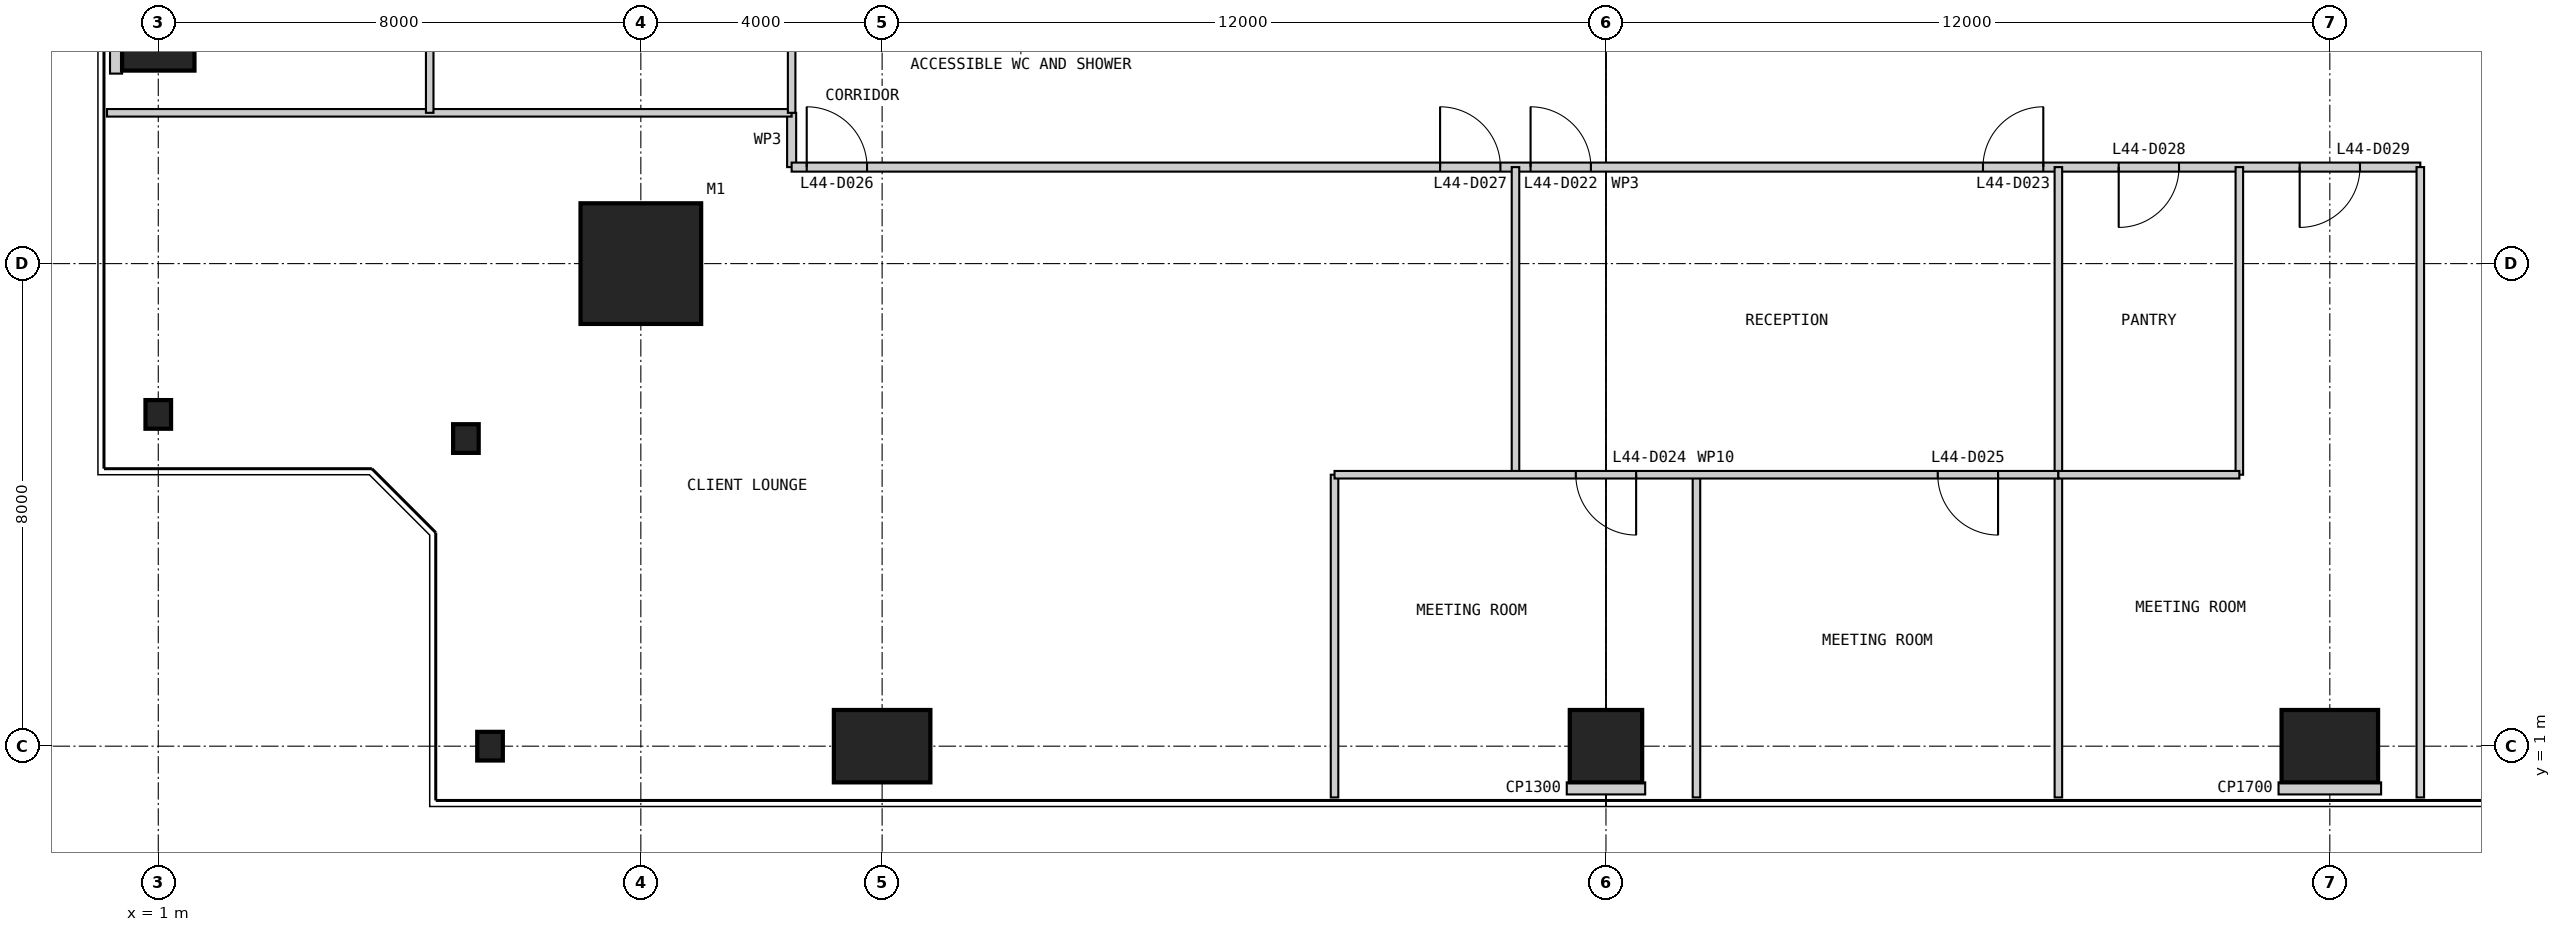
"""IFC4 building model, lengths in metres.
Left out: names, types, materials, properties, quantities, classifications, styles, units other than length and angle.
Written with IfcOpenShell. Run it as: python <this file> out.ifc"""

import sys

from ifc_helpers import new_model, si_unit, direction, frame, frame_2d, origin, origin_2d, place, context, subcontext, project, spatial, rectangle, i_section, extrude, element, fill, save


model = new_model("IFC4")
c1 = context("Model", 3, precision=1e-05, world=origin(), true_north=direction((0.0, 1.0)))
c2 = subcontext(c1, "Body", "Model", "MODEL_VIEW")
j1 = project(units=[si_unit("LENGTHUNIT", "METRE"), si_unit("PLANEANGLEUNIT", "RADIAN")], contexts=[c1])
p1 = place(None, origin())
s1 = spatial("IfcSite", under=j1, at=p1, CompositionType="ELEMENT")
p2 = place(p1, origin())
s2 = spatial("IfcBuilding", under=s1, at=p2, CompositionType="ELEMENT")
p3 = place(p2, frame((0.0, 0.0, 189.8)))
s3 = spatial("IfcBuildingStorey", under=s2, at=p3, CompositionType="ELEMENT", Elevation=189.8)
p4 = place(p3, frame((9.0, 9.0, 0.0), z_axis=(0.0, 0.0, 1.0), x_axis=(1.0, 0.0, 0.0)))
e1 = element("IfcColumn", 1, at=p4, inside=s3, PredefinedType="COLUMN", context=c2, shape_type="SweptSolid", body=[
    extrude(rectangle(XDim=2.0, YDim=2.0, at=origin_2d()), origin(), (0.0, 0.0, 1.0), 4.0),
])
p5 = place(p3, frame((6.5, 1.0, 0.0), z_axis=(0.0, 0.0, 1.0), x_axis=(1.0, 0.0, 0.0)))
e2 = element("IfcColumn", 2, at=p5, inside=s3, PredefinedType="COLUMN", context=c2, shape_type="SweptSolid", body=[
    extrude(i_section(OverallWidth=0.424, OverallDepth=0.475, WebThickness=0.048, FlangeThickness=0.077, at=origin_2d()), origin(), (0.0, 0.0, 1.0), 4.0),
])
p6 = place(p3, frame((13.0, 1.0, 0.0), z_axis=(0.0, 0.0, 1.0), x_axis=(1.0, 0.0, 0.0)))
e3 = element("IfcColumn", 3, at=p6, inside=s3, PredefinedType="COLUMN", context=c2, shape_type="SweptSolid", body=[
    extrude(rectangle(XDim=1.6, YDim=1.2, at=origin_2d()), origin(), (0.0, 0.0, 1.0), 4.0),
])
p7 = place(p3, frame((25.0, 1.0, 0.0), z_axis=(0.0, 0.0, 1.0), x_axis=(1.0, 0.0, 0.0)))
e4 = element("IfcColumn", 4, at=p7, inside=s3, PredefinedType="COLUMN", context=c2, shape_type="SweptSolid", body=[
    extrude(rectangle(XDim=1.2, YDim=1.2, at=origin_2d()), origin(), (0.0, 0.0, 1.0), 4.0),
])
p8 = place(p3, frame((37.0, 1.0, 0.0), z_axis=(0.0, 0.0, 1.0), x_axis=(1.0, 0.0, 0.0)))
e5 = element("IfcColumn", 5, at=p8, inside=s3, PredefinedType="COLUMN", context=c2, shape_type="SweptSolid", body=[
    extrude(rectangle(XDim=1.6, YDim=1.2, at=origin_2d()), origin(), (0.0, 0.0, 1.0), 4.0),
])
p9 = place(p3, frame((1.0, 13.0, 0.0), z_axis=(0.0, 0.0, 1.0), x_axis=(1.0, 0.0, 0.0)))
e6 = element("IfcColumn", 6, at=p9, inside=s3, PredefinedType="COLUMN", context=c2, shape_type="SweptSolid", body=[
    extrude(rectangle(XDim=1.2, YDim=1.6, at=origin_2d()), origin(), (0.0, 0.0, 1.0), 4.0),
])
for number, where, z_axis, x_axis in (
    (7, (1.0, 6.5, 0.0), (0.0, 0.0, 1.0), (1.0, 0.0, 0.0)),
    (8, (6.1, 6.1, 0.0), (0.0, 0.0, 1.0), (1.0, 0.0, 0.0)),
):
    element("IfcColumn", number, at=place(p3, frame(where, z_axis=z_axis, x_axis=x_axis)), inside=s3, PredefinedType="COLUMN", context=c2, shape_type="SweptSolid", body=[
        extrude(i_section(OverallWidth=0.424, OverallDepth=0.475, WebThickness=0.048, FlangeThickness=0.077, at=origin_2d()), origin(), (0.0, 0.0, 1.0), 4.0),
    ])
p10 = place(p3, frame((11.5, 11.5, 0.0), z_axis=(0.0, 0.0, 1.0), x_axis=(0.0, -1.0, 0.0)))
e9 = element("IfcWall", 9, at=p10, inside=s3, PredefinedType="PARTITIONING", context=c2, shape_type="SweptSolid", body=[
    extrude(rectangle(XDim=0.9, YDim=0.15, at=frame_2d((0.45, 0.0))), origin(), (0.0, 0.0, 1.0), 3.85),
])
p11 = place(p3, frame((11.5, 10.6, 0.0), z_axis=(0.0, 0.0, 1.0), x_axis=(1.0, 0.0, 0.0)))
e10 = element("IfcWall", 10, at=p11, inside=s3, PredefinedType="PARTITIONING", context=c2, shape_type="SweptSolid", body=[
    extrude(rectangle(XDim=27.0, YDim=0.15, at=frame_2d((13.5, 0.0))), origin(), (0.0, 0.0, 1.0), 3.85),
])
p12 = place(p11, frame((12.25, 0.0, 0.0)))
e11 = element("IfcOpeningElement", 11, at=p12, cuts=e10, PredefinedType="OPENING", context=c2, shape_type="SweptSolid", body=[
    extrude(rectangle(XDim=1.0, YDim=2.2, at=frame_2d((0.5, 1.1))), frame((0.0, 0.085, 0.0), z_axis=(0.0, -1.0, 0.0), x_axis=(1.0, 0.0, 0.0)), (0.0, 0.0, 1.0), 0.17),
])
p13 = place(p11, frame((19.75, 0.0, 0.0)))
e12 = element("IfcOpeningElement", 12, at=p13, cuts=e10, PredefinedType="OPENING", context=c2, shape_type="SweptSolid", body=[
    extrude(rectangle(XDim=1.0, YDim=2.2, at=frame_2d((0.5, 1.1))), frame((0.0, 0.085, 0.0), z_axis=(0.0, -1.0, 0.0), x_axis=(1.0, 0.0, 0.0)), (0.0, 0.0, 1.0), 0.17),
])
p14 = place(p11, frame((0.25, 0.0, 0.0)))
e13 = element("IfcOpeningElement", 13, at=p14, cuts=e10, PredefinedType="OPENING", context=c2, shape_type="SweptSolid", body=[
    extrude(rectangle(XDim=1.0, YDim=2.2, at=frame_2d((0.5, 1.1))), frame((0.0, 0.085, 0.0), z_axis=(0.0, -1.0, 0.0), x_axis=(1.0, 0.0, 0.0)), (0.0, 0.0, 1.0), 0.17),
])
p15 = place(p11, frame((10.75, 0.0, 0.0)))
e14 = element("IfcOpeningElement", 14, at=p15, cuts=e10, PredefinedType="OPENING", context=c2, shape_type="SweptSolid", body=[
    extrude(rectangle(XDim=1.0, YDim=2.2, at=frame_2d((0.5, 1.1))), frame((0.0, 0.085, 0.0), z_axis=(0.0, -1.0, 0.0), x_axis=(1.0, 0.0, 0.0)), (0.0, 0.0, 1.0), 0.17),
])
p16 = place(p11, frame((22.0, 0.0, 0.0)))
e15 = element("IfcOpeningElement", 15, at=p16, cuts=e10, PredefinedType="OPENING", context=c2, shape_type="SweptSolid", body=[
    extrude(rectangle(XDim=1.0, YDim=2.2, at=frame_2d((0.5, 1.1))), frame((0.0, 0.085, 0.0), z_axis=(0.0, -1.0, 0.0), x_axis=(1.0, 0.0, 0.0)), (0.0, 0.0, 1.0), 0.17),
])
p17 = place(p11, frame((25.0, 0.0, 0.0)))
e16 = element("IfcOpeningElement", 16, at=p17, cuts=e10, PredefinedType="OPENING", context=c2, shape_type="SweptSolid", body=[
    extrude(rectangle(XDim=1.0, YDim=2.2, at=frame_2d((0.5, 1.1))), frame((0.0, 0.085, 0.0), z_axis=(0.0, -1.0, 0.0), x_axis=(1.0, 0.0, 0.0)), (0.0, 0.0, 1.0), 0.17),
])
p18 = place(p3, frame((0.15, 11.5, 0.0), z_axis=(0.0, 0.0, 1.0), x_axis=(1.0, 0.0, 0.0)))
e17 = element("IfcWall", 17, at=p18, inside=s3, PredefinedType="PARTITIONING", context=c2, shape_type="SweptSolid", body=[
    extrude(rectangle(XDim=11.35, YDim=0.125, at=frame_2d((5.675, 0.0))), origin(), (0.0, 0.0, 1.0), 3.85),
])
p19 = place(p3, frame((20.5, 0.15, 0.0), z_axis=(0.0, 0.0, 1.0), x_axis=(0.0, 1.0, 0.0)))
e18 = element("IfcWall", 18, at=p19, inside=s3, PredefinedType="PARTITIONING", context=c2, shape_type="SweptSolid", body=[
    extrude(rectangle(XDim=5.35, YDim=0.125, at=frame_2d((2.675, 0.0))), origin(), (0.0, 0.0, 1.0), 3.85),
])
p20 = place(p3, frame((23.5, 5.5, 0.0), z_axis=(0.0, 0.0, 1.0), x_axis=(0.0, 1.0, 0.0)))
e19 = element("IfcWall", 19, at=p20, inside=s3, PredefinedType="PARTITIONING", context=c2, shape_type="SweptSolid", body=[
    extrude(rectangle(XDim=5.1, YDim=0.125, at=frame_2d((2.55, 0.0))), origin(), (0.0, 0.0, 1.0), 3.85),
])
p21 = place(p3, frame((26.5, 0.15, 0.0), z_axis=(0.0, 0.0, 1.0), x_axis=(0.0, 1.0, 0.0)))
e20 = element("IfcWall", 20, at=p21, inside=s3, PredefinedType="PARTITIONING", context=c2, shape_type="SweptSolid", body=[
    extrude(rectangle(XDim=5.35, YDim=0.125, at=frame_2d((2.675, 0.0))), origin(), (0.0, 0.0, 1.0), 3.85),
])
p22 = place(p3, frame((32.5, 0.15, 0.0), z_axis=(0.0, 0.0, 1.0), x_axis=(0.0, 1.0, 0.0)))
e21 = element("IfcWall", 21, at=p22, inside=s3, PredefinedType="PARTITIONING", context=c2, shape_type="SweptSolid", body=[
    extrude(rectangle(XDim=10.45, YDim=0.125, at=frame_2d((5.225, 0.0))), origin(), (0.0, 0.0, 1.0), 3.85),
])
p23 = place(p3, frame((35.5, 5.5, 0.0), z_axis=(0.0, 0.0, 1.0), x_axis=(0.0, 1.0, 0.0)))
e22 = element("IfcWall", 22, at=p23, inside=s3, PredefinedType="PARTITIONING", context=c2, shape_type="SweptSolid", body=[
    extrude(rectangle(XDim=5.1, YDim=0.125, at=frame_2d((2.55, 0.0))), origin(), (0.0, 0.0, 1.0), 3.85),
])
p24 = place(p3, frame((20.5, 5.5, 0.0), z_axis=(0.0, 0.0, 1.0), x_axis=(1.0, 0.0, 0.0)))
e23 = element("IfcWall", 23, at=p24, inside=s3, PredefinedType="PARTITIONING", context=c2, shape_type="SweptSolid", body=[
    extrude(rectangle(XDim=12.0, YDim=0.125, at=frame_2d((6.0, 0.0))), origin(), (0.0, 0.0, 1.0), 3.85),
])
p25 = place(p24, frame((4.0, 0.0, 0.0)))
e24 = element("IfcOpeningElement", 24, at=p25, cuts=e23, PredefinedType="OPENING", context=c2, shape_type="SweptSolid", body=[
    extrude(rectangle(XDim=1.0, YDim=2.2, at=frame_2d((0.5, 1.1))), frame((0.0, 0.073, 0.0), z_axis=(0.0, -1.0, 0.0), x_axis=(1.0, 0.0, 0.0)), (0.0, 0.0, 1.0), 0.145),
])
p26 = place(p24, frame((10.0, 0.0, 0.0)))
e25 = element("IfcOpeningElement", 25, at=p26, cuts=e23, PredefinedType="OPENING", context=c2, shape_type="SweptSolid", body=[
    extrude(rectangle(XDim=1.0, YDim=2.2, at=frame_2d((0.5, 1.1))), frame((0.0, 0.073, 0.0), z_axis=(0.0, -1.0, 0.0), x_axis=(1.0, 0.0, 0.0)), (0.0, 0.0, 1.0), 0.145),
])
p27 = place(p3, frame((32.5, 5.5, 0.0), z_axis=(0.0, 0.0, 1.0), x_axis=(1.0, 0.0, 0.0)))
e26 = element("IfcWall", 26, at=p27, inside=s3, PredefinedType="PARTITIONING", context=c2, shape_type="SweptSolid", body=[
    extrude(rectangle(XDim=3.0, YDim=0.125, at=frame_2d((1.5, 0.0))), origin(), (0.0, 0.0, 1.0), 3.85),
])
p28 = place(p3, frame((38.5, 0.15, 0.0), z_axis=(0.0, 0.0, 1.0), x_axis=(0.0, 1.0, 0.0)))
e27 = element("IfcWall", 27, at=p28, inside=s3, PredefinedType="PARTITIONING", context=c2, shape_type="SweptSolid", body=[
    extrude(rectangle(XDim=10.45, YDim=0.125, at=frame_2d((5.225, 0.0))), origin(), (0.0, 0.0, 1.0), 3.85),
])
p29 = place(p3, frame((5.5, 35.5, 0.0), z_axis=(0.0, 0.0, 1.0), x_axis=(0.0, -1.0, 0.0)))
e28 = element("IfcWall", 28, at=p29, inside=s3, PredefinedType="PARTITIONING", context=c2, shape_type="SweptSolid", body=[
    extrude(rectangle(XDim=24.0, YDim=0.125, at=frame_2d((12.0, 0.0))), origin(), (0.0, 0.0, 1.0), 3.85),
])
p30 = place(p29, frame((4.05, 0.0, 0.0)))
e29 = element("IfcOpeningElement", 29, at=p30, cuts=e28, PredefinedType="OPENING", context=c2, shape_type="SweptSolid", body=[
    extrude(rectangle(XDim=0.9, YDim=2.2, at=frame_2d((0.45, 1.1))), frame((0.0, 0.073, 0.0), z_axis=(0.0, -1.0, 0.0), x_axis=(1.0, 0.0, 0.0)), (0.0, 0.0, 1.0), 0.145),
])
p31 = place(p29, frame((10.05, 0.0, 0.0)))
e30 = element("IfcOpeningElement", 30, at=p31, cuts=e28, PredefinedType="OPENING", context=c2, shape_type="SweptSolid", body=[
    extrude(rectangle(XDim=0.9, YDim=2.2, at=frame_2d((0.45, 1.1))), frame((0.0, 0.073, 0.0), z_axis=(0.0, -1.0, 0.0), x_axis=(1.0, 0.0, 0.0)), (0.0, 0.0, 1.0), 0.145),
])
p32 = place(p29, frame((16.05, 0.0, 0.0)))
e31 = element("IfcOpeningElement", 31, at=p32, cuts=e28, PredefinedType="OPENING", context=c2, shape_type="SweptSolid", body=[
    extrude(rectangle(XDim=0.9, YDim=2.2, at=frame_2d((0.45, 1.1))), frame((0.0, 0.073, 0.0), z_axis=(0.0, -1.0, 0.0), x_axis=(1.0, 0.0, 0.0)), (0.0, 0.0, 1.0), 0.145),
])
p33 = place(p29, frame((19.05, 0.0, 0.0)))
e32 = element("IfcOpeningElement", 32, at=p33, cuts=e28, PredefinedType="OPENING", context=c2, shape_type="SweptSolid", body=[
    extrude(rectangle(XDim=0.9, YDim=2.2, at=frame_2d((0.45, 1.1))), frame((0.0, 0.073, 0.0), z_axis=(0.0, -1.0, 0.0), x_axis=(1.0, 0.0, 0.0)), (0.0, 0.0, 1.0), 0.145),
])
p34 = place(p3, frame((11.5, 14.5, 0.0), z_axis=(0.0, 0.0, 1.0), x_axis=(0.0, -1.0, 0.0)))
e33 = element("IfcWall", 33, at=p34, inside=s3, PredefinedType="PARTITIONING", context=c2, shape_type="SweptSolid", body=[
    extrude(rectangle(XDim=3.0, YDim=0.125, at=frame_2d((1.5, 0.0))), origin(), (0.0, 0.0, 1.0), 3.85),
])
p35 = place(p3, frame((25.0, 0.2, 0.0), z_axis=(0.0, 0.0, 1.0), x_axis=(0.0, 1.0, 0.0)))
e34 = element("IfcWall", 34, at=p35, inside=s3, PredefinedType="PARTITIONING", context=c2, shape_type="SweptSolid", body=[
    extrude(rectangle(XDim=0.2, YDim=1.3, at=frame_2d((0.1, 0.0))), origin(), (0.0, 0.0, 1.0), 3.85),
])
for number, where, z_axis, x_axis in (
    (35, (37.0, 0.2, 0.0), (0.0, 0.0, 1.0), (0.0, 1.0, 0.0)),
    (36, (0.2, 13.0, 0.0), (0.0, 0.0, 1.0), (1.0, 0.0, 0.0)),
):
    element("IfcWall", number, at=place(p3, frame(where, z_axis=z_axis, x_axis=x_axis)), inside=s3, PredefinedType="PARTITIONING", context=c2, shape_type="SweptSolid", body=[
        extrude(rectangle(XDim=0.2, YDim=1.7, at=frame_2d((0.1, 0.0))), origin(), (0.0, 0.0, 1.0), 3.85),
    ])
p36 = place(p12, origin())
e37 = element("IfcDoor", 37, at=p36, inside=s3, OperationType="SINGLE_SWING_LEFT", PredefinedType="DOOR", context=c2, shape_type="SweptSolid", body=[
    extrude(rectangle(XDim=1.0, YDim=2.2, at=frame_2d((0.5, 1.1))), frame((0.0, 0.025, 0.0), z_axis=(0.0, -1.0, 0.0), x_axis=(1.0, 0.0, 0.0)), (0.0, 0.0, 1.0), 0.05),
])
fill(e11, e37)
p37 = place(p13, origin())
e38 = element("IfcDoor", 38, at=p37, inside=s3, OperationType="SINGLE_SWING_RIGHT", PredefinedType="DOOR", context=c2, shape_type="SweptSolid", body=[
    extrude(rectangle(XDim=1.0, YDim=2.2, at=frame_2d((0.5, 1.1))), frame((0.0, 0.025, 0.0), z_axis=(0.0, -1.0, 0.0), x_axis=(1.0, 0.0, 0.0)), (0.0, 0.0, 1.0), 0.05),
])
fill(e12, e38)
p38 = place(p25, frame((1.0, 0.0, 0.0), z_axis=(0.0, 0.0, 1.0), x_axis=(-1.0, 0.0, 0.0)))
e39 = element("IfcDoor", 39, at=p38, inside=s3, OperationType="SINGLE_SWING_LEFT", PredefinedType="DOOR", context=c2, shape_type="SweptSolid", body=[
    extrude(rectangle(XDim=1.0, YDim=2.2, at=frame_2d((0.5, 1.1))), frame((0.0, 0.025, 0.0), z_axis=(0.0, -1.0, 0.0), x_axis=(1.0, 0.0, 0.0)), (0.0, 0.0, 1.0), 0.05),
])
fill(e24, e39)
p39 = place(p26, frame((1.0, 0.0, 0.0), z_axis=(0.0, 0.0, 1.0), x_axis=(-1.0, 0.0, 0.0)))
e40 = element("IfcDoor", 40, at=p39, inside=s3, OperationType="SINGLE_SWING_LEFT", PredefinedType="DOOR", context=c2, shape_type="SweptSolid", body=[
    extrude(rectangle(XDim=1.0, YDim=2.2, at=frame_2d((0.5, 1.1))), frame((0.0, 0.025, 0.0), z_axis=(0.0, -1.0, 0.0), x_axis=(1.0, 0.0, 0.0)), (0.0, 0.0, 1.0), 0.05),
])
fill(e25, e40)
p40 = place(p14, origin())
e41 = element("IfcDoor", 41, at=p40, inside=s3, OperationType="SINGLE_SWING_LEFT", PredefinedType="DOOR", context=c2, shape_type="SweptSolid", body=[
    extrude(rectangle(XDim=1.0, YDim=2.2, at=frame_2d((0.5, 1.1))), frame((0.0, 0.025, 0.0), z_axis=(0.0, -1.0, 0.0), x_axis=(1.0, 0.0, 0.0)), (0.0, 0.0, 1.0), 0.05),
])
fill(e13, e41)
p41 = place(p15, origin())
e42 = element("IfcDoor", 42, at=p41, inside=s3, OperationType="SINGLE_SWING_LEFT", PredefinedType="DOOR", context=c2, shape_type="SweptSolid", body=[
    extrude(rectangle(XDim=1.0, YDim=2.2, at=frame_2d((0.5, 1.1))), frame((0.0, 0.025, 0.0), z_axis=(0.0, -1.0, 0.0), x_axis=(1.0, 0.0, 0.0)), (0.0, 0.0, 1.0), 0.05),
])
fill(e14, e42)
p42 = place(p16, frame((1.0, 0.0, 0.0), z_axis=(0.0, 0.0, 1.0), x_axis=(-1.0, 0.0, 0.0)))
e43 = element("IfcDoor", 43, at=p42, inside=s3, OperationType="SINGLE_SWING_RIGHT", PredefinedType="DOOR", context=c2, shape_type="SweptSolid", body=[
    extrude(rectangle(XDim=1.0, YDim=2.2, at=frame_2d((0.5, 1.1))), frame((0.0, 0.025, 0.0), z_axis=(0.0, -1.0, 0.0), x_axis=(1.0, 0.0, 0.0)), (0.0, 0.0, 1.0), 0.05),
])
fill(e15, e43)
p43 = place(p17, frame((1.0, 0.0, 0.0), z_axis=(0.0, 0.0, 1.0), x_axis=(-1.0, 0.0, 0.0)))
e44 = element("IfcDoor", 44, at=p43, inside=s3, OperationType="SINGLE_SWING_RIGHT", PredefinedType="DOOR", context=c2, shape_type="SweptSolid", body=[
    extrude(rectangle(XDim=1.0, YDim=2.2, at=frame_2d((0.5, 1.1))), frame((0.0, 0.025, 0.0), z_axis=(0.0, -1.0, 0.0), x_axis=(1.0, 0.0, 0.0)), (0.0, 0.0, 1.0), 0.05),
])
fill(e16, e44)
save(model, sys.argv[1])
